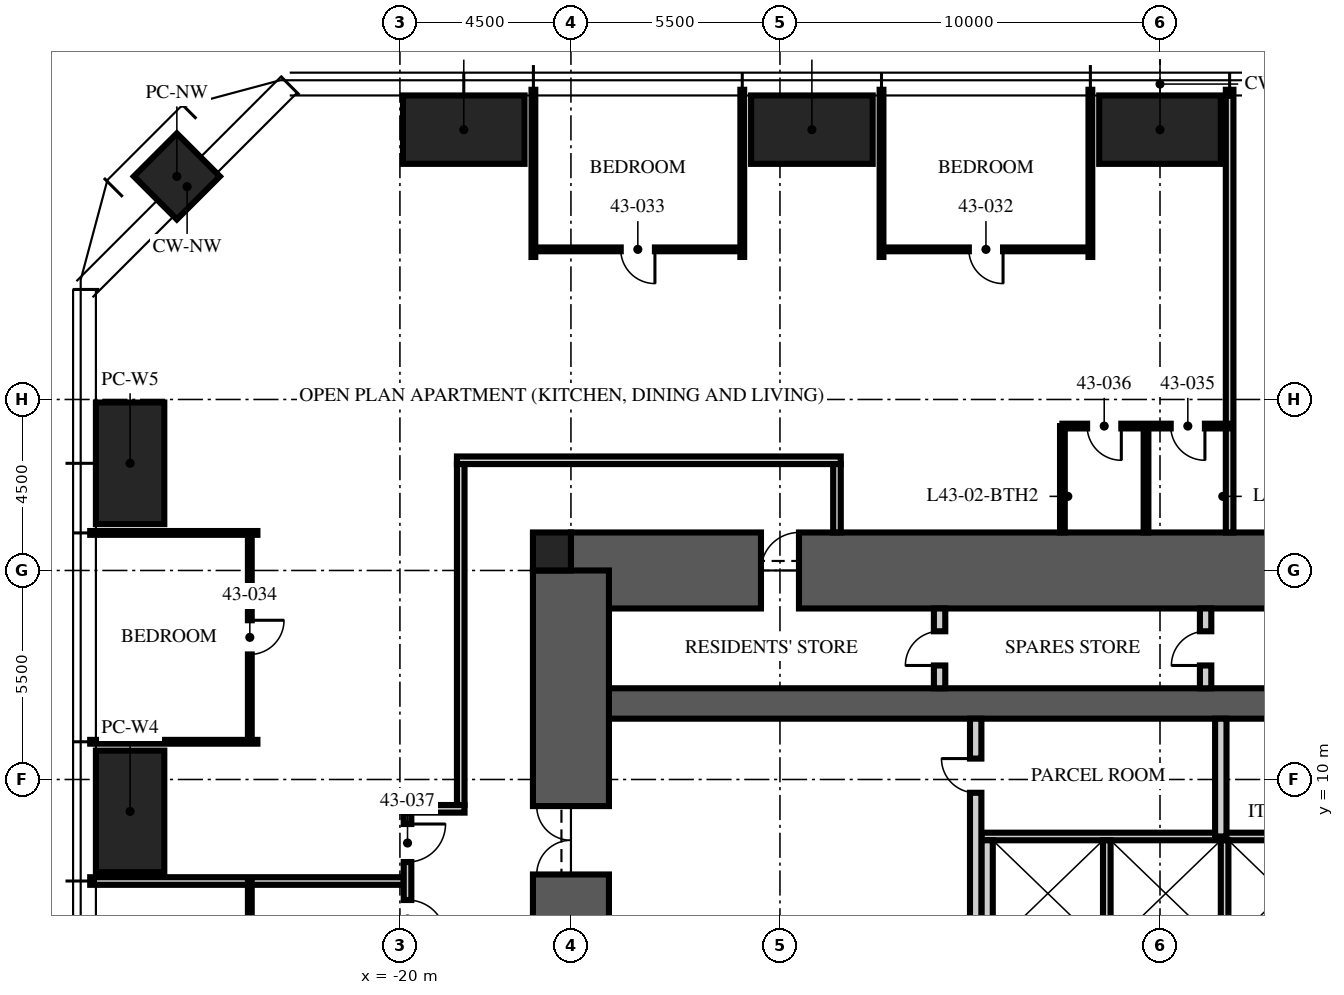
"""IFC4 building model, lengths in metres.
Left out: names, types, materials, properties, quantities, classifications, styles, units other than length and angle.
Written with IfcOpenShell. Run it as: python <this file> out.ifc"""

import sys

from ifc_helpers import new_model, si_unit, direction, frame, frame_2d, origin, origin_2d, place, context, subcontext, project, spatial, rectangle, hollow_rectangle, extrude, element, fill, save


model = new_model("IFC4")
c1 = context("Model", 3, precision=1e-05, world=origin(), true_north=direction((0.0, 1.0)))
c2 = subcontext(c1, "Body", "Model", "MODEL_VIEW")
j1 = project(units=[si_unit("LENGTHUNIT", "METRE"), si_unit("PLANEANGLEUNIT", "RADIAN")], contexts=[c1])
p1 = place(None, origin())
s1 = spatial("IfcSite", under=j1, at=p1, CompositionType="ELEMENT")
p2 = place(p1, origin())
s2 = spatial("IfcBuilding", under=s1, at=p2, CompositionType="ELEMENT")
p3 = place(p2, frame((0.0, 0.0, 171.0)))
s3 = spatial("IfcBuildingStorey", under=s2, at=p3, CompositionType="ELEMENT", Elevation=171.0)
p4 = place(p3, frame((-15.5, 15.5, -0.25), z_axis=(0.0, 0.0, 1.0), x_axis=(1.0, 0.0, 0.0)))
e1 = element("IfcWall", 1, at=p4, inside=s3, PredefinedType="SHEAR", context=c2, shape_type="SweptSolid", body=[
    extrude(rectangle(XDim=31.0, YDim=2.0, at=frame_2d((15.5, 0.0))), origin(), (0.0, 0.0, 1.0), 3.75),
])
p5 = place(p4, frame((5.0, 0.0, 0.25)))
e2 = element("IfcOpeningElement", 2, at=p5, cuts=e1, PredefinedType="OPENING", context=c2, shape_type="SweptSolid", body=[
    extrude(rectangle(XDim=1.0, YDim=2.1, at=frame_2d((0.5, 1.05))), frame((0.0, 1.01, 0.0), z_axis=(0.0, -1.0, 0.0), x_axis=(1.0, 0.0, 0.0)), (0.0, 0.0, 1.0), 2.02),
])
p6 = place(p3, frame((-15.5, 12.0, -0.25), z_axis=(0.0, 0.0, 1.0), x_axis=(1.0, 0.0, 0.0)))
e3 = element("IfcWall", 3, at=p6, inside=s3, PredefinedType="SHEAR", context=c2, shape_type="SweptSolid", body=[
    extrude(rectangle(XDim=31.0, YDim=0.8, at=frame_2d((15.5, 0.0))), origin(), (0.0, 0.0, 1.0), 3.75),
])
p7 = place(p3, frame((-15.5, -15.5, -0.25), z_axis=(0.0, 0.0, 1.0), x_axis=(0.0, 1.0, 0.0)))
e4 = element("IfcWall", 4, at=p7, inside=s3, PredefinedType="SHEAR", context=c2, shape_type="SweptSolid", body=[
    extrude(rectangle(XDim=31.0, YDim=2.0, at=frame_2d((15.5, 0.0))), origin(), (0.0, 0.0, 1.0), 3.75),
])
p8 = place(p7, frame((6.5, 0.0, 0.25)))
e5 = element("IfcOpeningElement", 5, at=p8, cuts=e4, PredefinedType="OPENING", context=c2, shape_type="SweptSolid", body=[
    extrude(rectangle(XDim=1.2, YDim=2.1, at=frame_2d((0.6, 1.05))), frame((0.0, 1.01, 0.0), z_axis=(0.0, -1.0, 0.0), x_axis=(1.0, 0.0, 0.0)), (0.0, 0.0, 1.0), 2.02),
])
p9 = place(p7, frame((23.0, 0.0, 0.25)))
e6 = element("IfcOpeningElement", 6, at=p9, cuts=e4, PredefinedType="OPENING", context=c2, shape_type="SweptSolid", body=[
    extrude(rectangle(XDim=1.8, YDim=2.1, at=frame_2d((0.9, 1.05))), frame((0.0, 1.01, 0.0), z_axis=(0.0, -1.0, 0.0), x_axis=(1.0, 0.0, 0.0)), (0.0, 0.0, 1.0), 2.02),
])
p10 = place(p3, frame((-16.0, 16.0, -0.25), z_axis=(0.0, 0.0, 1.0), x_axis=(1.0, 0.0, 0.0)))
e7 = element("IfcColumn", 7, at=p10, inside=s3, PredefinedType="COLUMN", context=c2, shape_type="SweptSolid", body=[
    extrude(rectangle(XDim=1.0, YDim=1.0, at=origin_2d()), origin(), (0.0, 0.0, 1.0), 3.75),
])
for number, where, z_axis, x_axis in (
    (8, (-18.32, 27.1, 0.0), (0.0, 0.0, 1.0), (1.0, 0.0, 0.0)),
    (9, (-9.16, 27.1, 0.0), (0.0, 0.0, 1.0), (1.0, 0.0, 0.0)),
    (10, (0.0, 27.1, 0.0), (0.0, 0.0, 1.0), (1.0, 0.0, 0.0)),
    (11, (-27.1, 9.16, 0.0), (0.0, 0.0, 1.0), (0.0, 1.0, 0.0)),
    (12, (-27.1, 18.32, 0.0), (0.0, 0.0, 1.0), (0.0, 1.0, 0.0)),
):
    element("IfcColumn", number, at=place(p3, frame(where, z_axis=z_axis, x_axis=x_axis)), inside=s3, PredefinedType="COLUMN", context=c2, shape_type="SweptSolid", body=[
        extrude(hollow_rectangle(XDim=3.2, YDim=1.8, WallThickness=0.2, at=origin_2d()), origin(), (0.0, 0.0, 1.0), 3.75),
    ])
p11 = place(p3, frame((-25.87, 25.87, 0.0), z_axis=(0.0, 0.0, 1.0), x_axis=(0.707106781187, 0.707106781187, 0.0)))
e13 = element("IfcColumn", 13, at=p11, inside=s3, PredefinedType="COLUMN", context=c2, shape_type="SweptSolid", body=[
    extrude(hollow_rectangle(XDim=1.6, YDim=1.6, WallThickness=0.1, at=origin_2d()), origin(), (0.0, 0.0, 1.0), 3.75),
])
p12 = place(p3, frame((-4.7, 8.5, 0.0), z_axis=(0.0, 0.0, 1.0), x_axis=(1.0, 0.0, 0.0)))
e14 = element("IfcWall", 14, at=p12, inside=s3, PredefinedType="PARTITIONING", context=c2, shape_type="SweptSolid", body=[
    extrude(rectangle(XDim=9.7, YDim=0.2, at=frame_2d((4.85, 0.0))), origin(), (0.0, 0.0, 1.0), 3.5),
])
p13 = place(p3, frame((-4.55, 5.6, 0.0), z_axis=(0.0, 0.0, 1.0), x_axis=(0.0, 1.0, 0.0)))
e15 = element("IfcWall", 15, at=p13, inside=s3, PredefinedType="PARTITIONING", context=c2, shape_type="SweptSolid", body=[
    extrude(rectangle(XDim=2.8, YDim=0.3, at=frame_2d((1.4, 0.0))), origin(), (0.0, 0.0, 1.0), 3.5),
])
for number, where, z_axis, x_axis in (
    (16, (-1.4, 5.6, 0.0), (0.0, 0.0, 1.0), (0.0, 1.0, 0.0)),
    (17, (1.7, 5.6, 0.0), (0.0, 0.0, 1.0), (0.0, 1.0, 0.0)),
):
    element("IfcWall", number, at=place(p3, frame(where, z_axis=z_axis, x_axis=x_axis)), inside=s3, PredefinedType="PARTITIONING", context=c2, shape_type="SweptSolid", body=[
        extrude(rectangle(XDim=2.8, YDim=0.2, at=frame_2d((1.4, 0.0))), origin(), (0.0, 0.0, 1.0), 3.5),
    ])
p14 = place(p3, frame((-4.85, 5.3, 0.0), z_axis=(0.0, 0.0, 1.0), x_axis=(0.0, 1.0, 0.0)))
e18 = element("IfcWall", 18, at=p14, inside=s3, PredefinedType="PARTITIONING", context=c2, shape_type="SweptSolid", body=[
    extrude(rectangle(XDim=6.3, YDim=0.3, at=frame_2d((3.15, 0.0))), origin(), (0.0, 0.0, 1.0), 3.5),
])
p15 = place(p14, frame((4.35, 0.0, 0.0)))
e19 = element("IfcOpeningElement", 19, at=p15, cuts=e18, PredefinedType="OPENING", context=c2, shape_type="SweptSolid", body=[
    extrude(rectangle(XDim=0.9, YDim=2.1, at=frame_2d((0.45, 1.05))), frame((0.0, 0.16, 0.0), z_axis=(0.0, -1.0, 0.0), x_axis=(1.0, 0.0, 0.0)), (0.0, 0.0, 1.0), 0.32),
])
p16 = place(p3, frame((1.6, 8.5, 0.0), z_axis=(0.0, 0.0, 1.0), x_axis=(0.0, 1.0, 0.0)))
e20 = element("IfcWall", 20, at=p16, inside=s3, PredefinedType="PARTITIONING", context=c2, shape_type="SweptSolid", body=[
    extrude(rectangle(XDim=3.1, YDim=0.3, at=frame_2d((1.55, 0.0))), origin(), (0.0, 0.0, 1.0), 3.5),
])
p17 = place(p3, frame((-5.8, 12.4, 0.0), z_axis=(0.0, 0.0, 1.0), x_axis=(0.0, 1.0, 0.0)))
e21 = element("IfcWall", 21, at=p17, inside=s3, PredefinedType="PARTITIONING", context=c2, shape_type="SweptSolid", body=[
    extrude(rectangle(XDim=2.1, YDim=0.3, at=frame_2d((1.05, 0.0))), origin(), (0.0, 0.0, 1.0), 3.5),
])
p18 = place(p17, frame((0.6, 0.0, 0.0)))
e22 = element("IfcOpeningElement", 22, at=p18, cuts=e21, PredefinedType="OPENING", context=c2, shape_type="SweptSolid", body=[
    extrude(rectangle(XDim=0.9, YDim=2.1, at=frame_2d((0.45, 1.05))), frame((0.0, 0.16, 0.0), z_axis=(0.0, -1.0, 0.0), x_axis=(1.0, 0.0, 0.0)), (0.0, 0.0, 1.0), 0.32),
])
p19 = place(p3, frame((1.2, 12.4, 0.0), z_axis=(0.0, 0.0, 1.0), x_axis=(0.0, 1.0, 0.0)))
e23 = element("IfcWall", 23, at=p19, inside=s3, PredefinedType="PARTITIONING", context=c2, shape_type="SweptSolid", body=[
    extrude(rectangle(XDim=2.1, YDim=0.3, at=frame_2d((1.05, 0.0))), origin(), (0.0, 0.0, 1.0), 3.5),
])
p20 = place(p19, frame((0.6, 0.0, 0.0)))
e24 = element("IfcOpeningElement", 24, at=p20, cuts=e23, PredefinedType="OPENING", context=c2, shape_type="SweptSolid", body=[
    extrude(rectangle(XDim=0.9, YDim=2.1, at=frame_2d((0.45, 1.05))), frame((0.0, 0.16, 0.0), z_axis=(0.0, -1.0, 0.0), x_axis=(1.0, 0.0, 0.0)), (0.0, 0.0, 1.0), 0.32),
])
p21 = place(p3, frame((-18.5, 18.4, 0.0), z_axis=(0.0, 0.0, 1.0), x_axis=(1.0, 0.0, 0.0)))
e25 = element("IfcWall", 25, at=p21, inside=s3, PredefinedType="PARTITIONING", context=c2, shape_type="SweptSolid", body=[
    extrude(rectangle(XDim=10.1, YDim=0.2, at=frame_2d((5.05, 0.0))), origin(), (0.0, 0.0, 1.0), 2.3),
])
p22 = place(p3, frame((-8.5, 18.3, 0.0), z_axis=(0.0, 0.0, 1.0), x_axis=(0.0, -1.0, 0.0)))
e26 = element("IfcWall", 26, at=p22, inside=s3, PredefinedType="PARTITIONING", context=c2, shape_type="SweptSolid", body=[
    extrude(rectangle(XDim=1.8, YDim=0.2, at=frame_2d((0.9, 0.0))), origin(), (0.0, 0.0, 1.0), 3.5),
])
p23 = place(p3, frame((1.832, 16.5, 0.0), z_axis=(0.0, 0.0, 1.0), x_axis=(0.0, 1.0, 0.0)))
e27 = element("IfcWall", 27, at=p23, inside=s3, PredefinedType="PARTITIONING", context=c2, shape_type="SweptSolid", body=[
    extrude(rectangle(XDim=11.65, YDim=0.2, at=frame_2d((5.825, 0.0))), origin(), (0.0, 0.0, 1.0), 2.81),
])
for number, where, z_axis, x_axis in (
    (28, (-1.832, 23.75, 0.0), (0.0, 0.0, 1.0), (0.0, 1.0, 0.0)),
    (29, (-7.328, 23.75, 0.0), (0.0, 0.0, 1.0), (0.0, 1.0, 0.0)),
    (30, (-10.992, 23.75, 0.0), (0.0, 0.0, 1.0), (0.0, 1.0, 0.0)),
    (31, (-16.488, 23.75, 0.0), (0.0, 0.0, 1.0), (0.0, 1.0, 0.0)),
    (32, (-23.75, 16.488, 0.0), (0.0, 0.0, 1.0), (-1.0, 0.0, 0.0)),
    (33, (-23.75, 10.992, 0.0), (0.0, 0.0, 1.0), (-1.0, 0.0, 0.0)),
):
    element("IfcWall", number, at=place(p3, frame(where, z_axis=z_axis, x_axis=x_axis)), inside=s3, PredefinedType="PARTITIONING", context=c2, shape_type="SweptSolid", body=[
        extrude(rectangle(XDim=4.4, YDim=0.1, at=frame_2d((2.2, 0.0))), origin(), (0.0, 0.0, 1.0), 2.81),
    ])
p24 = place(p3, frame((-19.9, 7.328, 0.0), z_axis=(0.0, 0.0, 1.0), x_axis=(-1.0, 0.0, 0.0)))
e34 = element("IfcWall", 34, at=p24, inside=s3, PredefinedType="PARTITIONING", context=c2, shape_type="SweptSolid", body=[
    extrude(rectangle(XDim=8.25, YDim=0.2, at=frame_2d((4.125, 0.0))), origin(), (0.0, 0.0, 1.0), 2.81),
])
p25 = place(p3, frame((-1.832, 23.95, 0.0), z_axis=(0.0, 0.0, 1.0), x_axis=(-1.0, 0.0, 0.0)))
e35 = element("IfcWall", 35, at=p25, inside=s3, PredefinedType="PARTITIONING", context=c2, shape_type="SweptSolid", body=[
    extrude(rectangle(XDim=5.496, YDim=0.1, at=frame_2d((2.748, 0.0))), origin(), (0.0, 0.0, 1.0), 2.81),
])
p26 = place(p25, frame((2.298, 0.0, 0.0)))
e36 = element("IfcOpeningElement", 36, at=p26, cuts=e35, PredefinedType="OPENING", context=c2, shape_type="SweptSolid", body=[
    extrude(rectangle(XDim=0.9, YDim=2.1, at=frame_2d((0.45, 1.05))), frame((0.0, 0.06, 0.0), z_axis=(0.0, -1.0, 0.0), x_axis=(1.0, 0.0, 0.0)), (0.0, 0.0, 1.0), 0.12),
])
p27 = place(p3, frame((-10.992, 23.95, 0.0), z_axis=(0.0, 0.0, 1.0), x_axis=(-1.0, 0.0, 0.0)))
e37 = element("IfcWall", 37, at=p27, inside=s3, PredefinedType="PARTITIONING", context=c2, shape_type="SweptSolid", body=[
    extrude(rectangle(XDim=5.496, YDim=0.1, at=frame_2d((2.748, 0.0))), origin(), (0.0, 0.0, 1.0), 2.81),
])
p28 = place(p27, frame((2.298, 0.0, 0.0)))
e38 = element("IfcOpeningElement", 38, at=p28, cuts=e37, PredefinedType="OPENING", context=c2, shape_type="SweptSolid", body=[
    extrude(rectangle(XDim=0.9, YDim=2.1, at=frame_2d((0.45, 1.05))), frame((0.0, 0.06, 0.0), z_axis=(0.0, -1.0, 0.0), x_axis=(1.0, 0.0, 0.0)), (0.0, 0.0, 1.0), 0.12),
])
p29 = place(p3, frame((-23.95, 16.488, 0.0), z_axis=(0.0, 0.0, 1.0), x_axis=(0.0, -1.0, 0.0)))
e39 = element("IfcWall", 39, at=p29, inside=s3, PredefinedType="PARTITIONING", context=c2, shape_type="SweptSolid", body=[
    extrude(rectangle(XDim=5.496, YDim=0.1, at=frame_2d((2.748, 0.0))), origin(), (0.0, 0.0, 1.0), 2.81),
])
p30 = place(p29, frame((2.298, 0.0, 0.0)))
e40 = element("IfcOpeningElement", 40, at=p30, cuts=e39, PredefinedType="OPENING", context=c2, shape_type="SweptSolid", body=[
    extrude(rectangle(XDim=0.9, YDim=2.1, at=frame_2d((0.45, 1.05))), frame((0.0, 0.06, 0.0), z_axis=(0.0, -1.0, 0.0), x_axis=(1.0, 0.0, 0.0)), (0.0, 0.0, 1.0), 0.12),
])
p31 = place(p3, frame((1.832, 19.3, 0.0), z_axis=(0.0, 0.0, 1.0), x_axis=(-1.0, 0.0, 0.0)))
e41 = element("IfcWall", 41, at=p31, inside=s3, PredefinedType="PARTITIONING", context=c2, shape_type="SweptSolid", body=[
    extrude(rectangle(XDim=4.4, YDim=0.125, at=frame_2d((2.2, 0.0))), origin(), (0.0, 0.0, 1.0), 2.7),
])
p32 = place(p31, frame((0.65, 0.0, 0.0)))
e42 = element("IfcOpeningElement", 42, at=p32, cuts=e41, PredefinedType="OPENING", context=c2, shape_type="SweptSolid", body=[
    extrude(rectangle(XDim=0.9, YDim=2.1, at=frame_2d((0.45, 1.05))), frame((0.0, 0.073, 0.0), z_axis=(0.0, -1.0, 0.0), x_axis=(1.0, 0.0, 0.0)), (0.0, 0.0, 1.0), 0.145),
])
p33 = place(p31, frame((2.85, 0.0, 0.0)))
e43 = element("IfcOpeningElement", 43, at=p33, cuts=e41, PredefinedType="OPENING", context=c2, shape_type="SweptSolid", body=[
    extrude(rectangle(XDim=0.9, YDim=2.1, at=frame_2d((0.45, 1.05))), frame((0.0, 0.073, 0.0), z_axis=(0.0, -1.0, 0.0), x_axis=(1.0, 0.0, 0.0)), (0.0, 0.0, 1.0), 0.145),
])
for number, where, z_axis, x_axis in (
    (44, (-0.368, 16.5, 0.0), (0.0, 0.0, 1.0), (0.0, 1.0, 0.0)),
    (45, (-2.568, 16.5, 0.0), (0.0, 0.0, 1.0), (0.0, 1.0, 0.0)),
):
    element("IfcWall", number, at=place(p3, frame(where, z_axis=z_axis, x_axis=x_axis)), inside=s3, PredefinedType="PARTITIONING", context=c2, shape_type="SweptSolid", body=[
        extrude(rectangle(XDim=2.8, YDim=0.125, at=frame_2d((1.4, 0.0))), origin(), (0.0, 0.0, 1.0), 3.5),
    ])
p34 = place(p3, frame((-23.95, 7.328, 0.0), z_axis=(0.0, 0.0, 1.0), x_axis=(0.0, -1.0, 0.0)))
e46 = element("IfcWall", 46, at=p34, inside=s3, PredefinedType="PARTITIONING", context=c2, shape_type="SweptSolid", body=[
    extrude(rectangle(XDim=5.496, YDim=0.1, at=frame_2d((2.748, 0.0))), origin(), (0.0, 0.0, 1.0), 2.81),
])
p35 = place(p34, frame((2.298, 0.0, 0.0)))
e47 = element("IfcOpeningElement", 47, at=p35, cuts=e46, PredefinedType="OPENING", context=c2, shape_type="SweptSolid", body=[
    extrude(rectangle(XDim=0.9, YDim=2.1, at=frame_2d((0.45, 1.05))), frame((0.0, 0.06, 0.0), z_axis=(0.0, -1.0, 0.0), x_axis=(1.0, 0.0, 0.0)), (0.0, 0.0, 1.0), 0.12),
])
p36 = place(p3, frame((-18.4, 18.3, 0.0), z_axis=(0.0, 0.0, 1.0), x_axis=(0.0, -1.0, 0.0)))
e48 = element("IfcWall", 48, at=p36, inside=s3, PredefinedType="PARTITIONING", context=c2, shape_type="SweptSolid", body=[
    extrude(rectangle(XDim=8.972, YDim=0.2, at=frame_2d((4.486, 0.0))), origin(), (0.0, 0.0, 1.0), 2.3),
])
p37 = place(p3, frame((-18.3, 9.228, 0.0), z_axis=(0.0, 0.0, 1.0), x_axis=(-1.0, 0.0, 0.0)))
e49 = element("IfcWall", 49, at=p37, inside=s3, PredefinedType="PARTITIONING", context=c2, shape_type="SweptSolid", body=[
    extrude(rectangle(XDim=1.6, YDim=0.2, at=frame_2d((0.8, 0.0))), origin(), (0.0, 0.0, 1.0), 2.7),
])
p38 = place(p3, frame((-19.8, 9.128, 0.0), z_axis=(0.0, 0.0, 1.0), x_axis=(0.0, -1.0, 0.0)))
e50 = element("IfcWall", 50, at=p38, inside=s3, PredefinedType="PARTITIONING", context=c2, shape_type="SweptSolid", body=[
    extrude(rectangle(XDim=3.6, YDim=0.2, at=frame_2d((1.8, 0.0))), origin(), (0.0, 0.0, 1.0), 2.7),
])
p39 = place(p38, frame((0.3, 0.0, 0.0)))
e51 = element("IfcOpeningElement", 51, at=p39, cuts=e50, PredefinedType="OPENING", context=c2, shape_type="SweptSolid", body=[
    extrude(rectangle(XDim=1.0, YDim=2.2, at=frame_2d((0.5, 1.1))), frame((0.0, 0.11, 0.0), z_axis=(0.0, -1.0, 0.0), x_axis=(1.0, 0.0, 0.0)), (0.0, 0.0, 1.0), 0.22),
])
p40 = place(p38, frame((2.3, 0.0, 0.0)))
e52 = element("IfcOpeningElement", 52, at=p40, cuts=e50, PredefinedType="OPENING", context=c2, shape_type="SweptSolid", body=[
    extrude(rectangle(XDim=1.0, YDim=2.2, at=frame_2d((0.5, 1.1))), frame((0.0, 0.11, 0.0), z_axis=(0.0, -1.0, 0.0), x_axis=(1.0, 0.0, 0.0)), (0.0, 0.0, 1.0), 0.22),
])
p41 = place(p9, origin())
e53 = element("IfcDoor", 53, at=p41, inside=s3, OperationType="DOUBLE_DOOR_SINGLE_SWING", PredefinedType="DOOR", context=c2, shape_type="SweptSolid", body=[
    extrude(rectangle(XDim=1.8, YDim=2.1, at=frame_2d((0.9, 1.05))), frame((0.0, 0.025, 0.0), z_axis=(0.0, -1.0, 0.0), x_axis=(1.0, 0.0, 0.0)), (0.0, 0.0, 1.0), 0.05),
])
fill(e6, e53)
p42 = place(p15, origin())
e54 = element("IfcDoor", 54, at=p42, inside=s3, OperationType="SINGLE_SWING_RIGHT", PredefinedType="DOOR", context=c2, shape_type="SweptSolid", body=[
    extrude(rectangle(XDim=0.9, YDim=2.1, at=frame_2d((0.45, 1.05))), frame((0.0, 0.025, 0.0), z_axis=(0.0, -1.0, 0.0), x_axis=(1.0, 0.0, 0.0)), (0.0, 0.0, 1.0), 0.05),
])
fill(e19, e54)
p43 = place(p18, origin())
e55 = element("IfcDoor", 55, at=p43, inside=s3, OperationType="SINGLE_SWING_LEFT", PredefinedType="DOOR", context=c2, shape_type="SweptSolid", body=[
    extrude(rectangle(XDim=0.9, YDim=2.1, at=frame_2d((0.45, 1.05))), frame((0.0, 0.025, 0.0), z_axis=(0.0, -1.0, 0.0), x_axis=(1.0, 0.0, 0.0)), (0.0, 0.0, 1.0), 0.05),
])
fill(e22, e55)
p44 = place(p20, origin())
e56 = element("IfcDoor", 56, at=p44, inside=s3, OperationType="SINGLE_SWING_LEFT", PredefinedType="DOOR", context=c2, shape_type="SweptSolid", body=[
    extrude(rectangle(XDim=0.9, YDim=2.1, at=frame_2d((0.45, 1.05))), frame((0.0, 0.025, 0.0), z_axis=(0.0, -1.0, 0.0), x_axis=(1.0, 0.0, 0.0)), (0.0, 0.0, 1.0), 0.05),
])
fill(e24, e56)
p45 = place(p5, origin())
e57 = element("IfcDoor", 57, at=p45, inside=s3, OperationType="SINGLE_SWING_RIGHT", PredefinedType="DOOR", context=c2, shape_type="SweptSolid", body=[
    extrude(rectangle(XDim=1.0, YDim=2.1, at=frame_2d((0.5, 1.05))), frame((0.0, 0.025, 0.0), z_axis=(0.0, -1.0, 0.0), x_axis=(1.0, 0.0, 0.0)), (0.0, 0.0, 1.0), 0.05),
])
fill(e2, e57)
p46 = place(p26, origin())
e58 = element("IfcDoor", 58, at=p46, inside=s3, OperationType="SINGLE_SWING_LEFT", PredefinedType="DOOR", context=c2, shape_type="SweptSolid", body=[
    extrude(rectangle(XDim=0.9, YDim=2.1, at=frame_2d((0.45, 1.05))), frame((0.0, 0.025, 0.0), z_axis=(0.0, -1.0, 0.0), x_axis=(1.0, 0.0, 0.0)), (0.0, 0.0, 1.0), 0.05),
])
fill(e36, e58)
p47 = place(p28, origin())
e59 = element("IfcDoor", 59, at=p47, inside=s3, OperationType="SINGLE_SWING_LEFT", PredefinedType="DOOR", context=c2, shape_type="SweptSolid", body=[
    extrude(rectangle(XDim=0.9, YDim=2.1, at=frame_2d((0.45, 1.05))), frame((0.0, 0.025, 0.0), z_axis=(0.0, -1.0, 0.0), x_axis=(1.0, 0.0, 0.0)), (0.0, 0.0, 1.0), 0.05),
])
fill(e38, e59)
p48 = place(p30, origin())
e60 = element("IfcDoor", 60, at=p48, inside=s3, OperationType="SINGLE_SWING_LEFT", PredefinedType="DOOR", context=c2, shape_type="SweptSolid", body=[
    extrude(rectangle(XDim=0.9, YDim=2.1, at=frame_2d((0.45, 1.05))), frame((0.0, 0.025, 0.0), z_axis=(0.0, -1.0, 0.0), x_axis=(1.0, 0.0, 0.0)), (0.0, 0.0, 1.0), 0.05),
])
fill(e40, e60)
p49 = place(p32, origin())
e61 = element("IfcDoor", 61, at=p49, inside=s3, OperationType="SINGLE_SWING_LEFT", PredefinedType="DOOR", context=c2, shape_type="SweptSolid", body=[
    extrude(rectangle(XDim=0.9, YDim=2.1, at=frame_2d((0.45, 1.05))), frame((0.0, 0.025, 0.0), z_axis=(0.0, -1.0, 0.0), x_axis=(1.0, 0.0, 0.0)), (0.0, 0.0, 1.0), 0.05),
])
fill(e42, e61)
p50 = place(p33, origin())
e62 = element("IfcDoor", 62, at=p50, inside=s3, OperationType="SINGLE_SWING_LEFT", PredefinedType="DOOR", context=c2, shape_type="SweptSolid", body=[
    extrude(rectangle(XDim=0.9, YDim=2.1, at=frame_2d((0.45, 1.05))), frame((0.0, 0.025, 0.0), z_axis=(0.0, -1.0, 0.0), x_axis=(1.0, 0.0, 0.0)), (0.0, 0.0, 1.0), 0.05),
])
fill(e43, e62)
p51 = place(p39, origin())
e63 = element("IfcDoor", 63, at=p51, inside=s3, OperationType="SINGLE_SWING_LEFT", PredefinedType="DOOR", context=c2, shape_type="SweptSolid", body=[
    extrude(rectangle(XDim=1.0, YDim=2.2, at=frame_2d((0.5, 1.1))), frame((0.0, 0.025, 0.0), z_axis=(0.0, -1.0, 0.0), x_axis=(1.0, 0.0, 0.0)), (0.0, 0.0, 1.0), 0.05),
])
fill(e51, e63)
p52 = place(p40, origin())
e64 = element("IfcDoor", 64, at=p52, inside=s3, OperationType="SINGLE_SWING_RIGHT", PredefinedType="DOOR", context=c2, shape_type="SweptSolid", body=[
    extrude(rectangle(XDim=1.0, YDim=2.2, at=frame_2d((0.5, 1.1))), frame((0.0, 0.025, 0.0), z_axis=(0.0, -1.0, 0.0), x_axis=(1.0, 0.0, 0.0)), (0.0, 0.0, 1.0), 0.05),
])
fill(e52, e64)
save(model, sys.argv[1])
